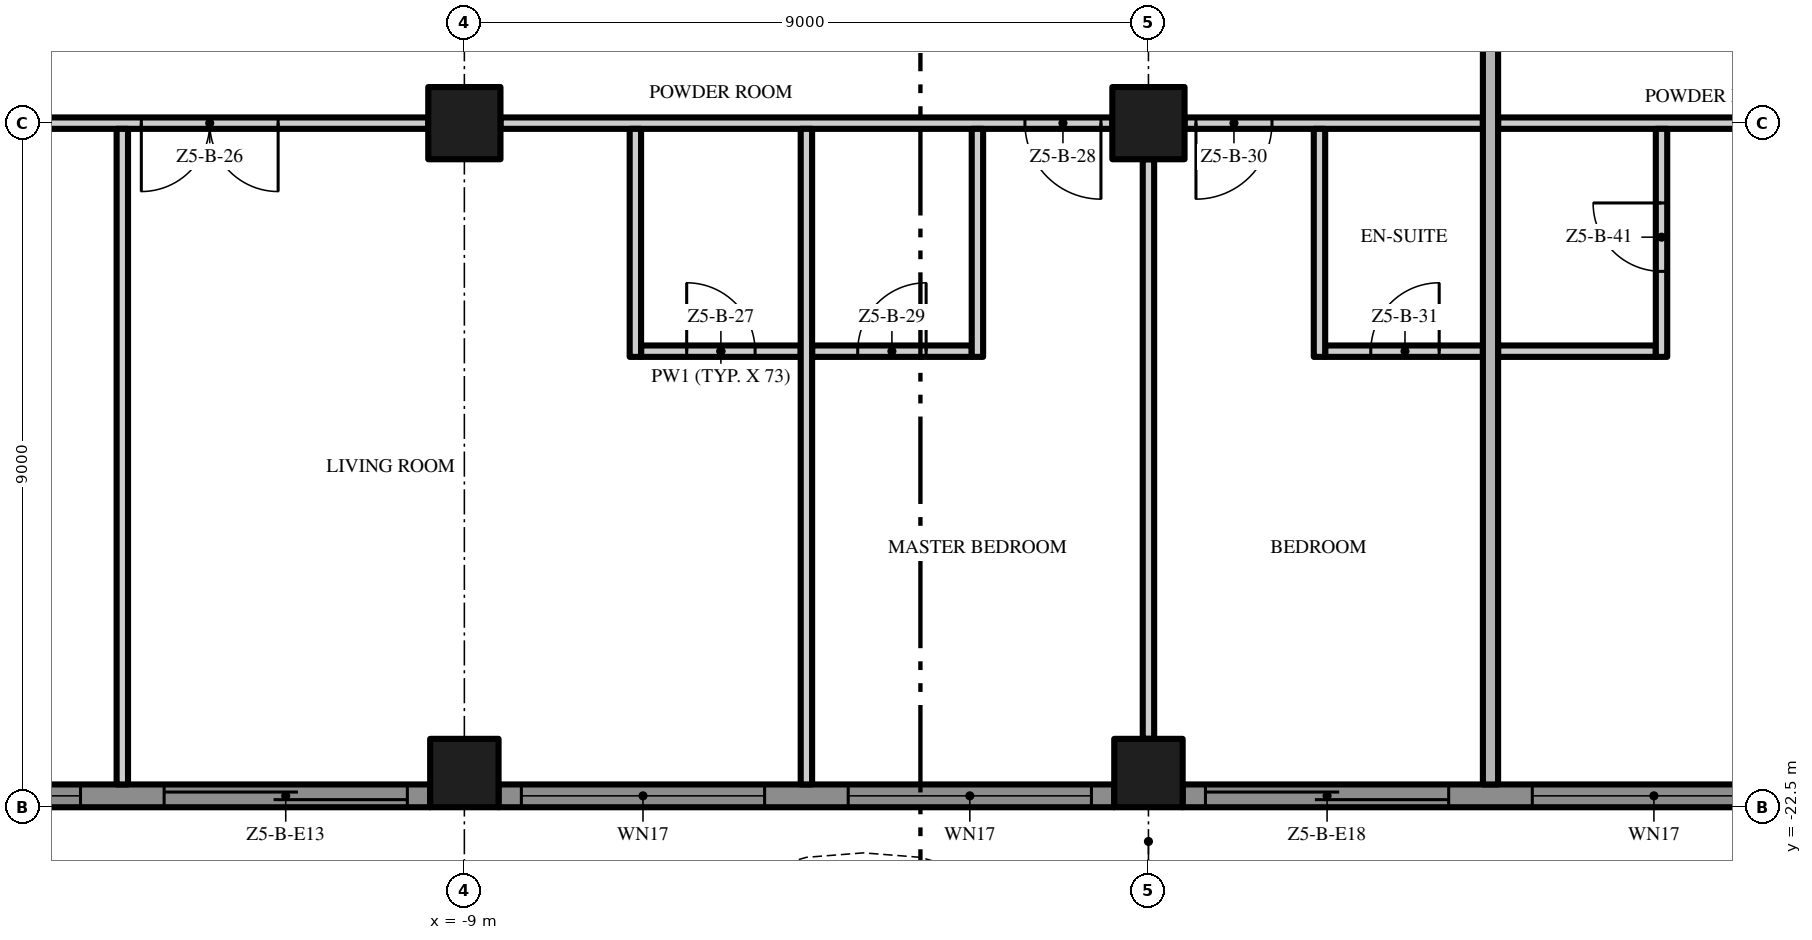
"""IFC4 building model, lengths in metres.
Left out: names, types, materials, properties, quantities, classifications, styles, units other than length and angle.
Written with IfcOpenShell. Run it as: python <this file> out.ifc"""

import sys

from ifc_helpers import new_model, si_unit, direction, frame, frame_2d, origin, origin_2d, place, context, subcontext, project, spatial, polyline, rectangle, outline, extrude, element, fill, save


model = new_model("IFC4")
c1 = context("Model", 3, precision=1e-05, world=origin(), true_north=direction((0.0, 1.0)))
c2 = subcontext(c1, "Body", "Model", "MODEL_VIEW")
j1 = project(units=[si_unit("LENGTHUNIT", "METRE"), si_unit("PLANEANGLEUNIT", "RADIAN")], contexts=[c1])
p1 = place(None, origin())
s1 = spatial("IfcSite", under=j1, at=p1, CompositionType="ELEMENT")
p2 = place(p1, origin())
s2 = spatial("IfcBuilding", under=s1, at=p2, CompositionType="ELEMENT")
p3 = place(p2, frame((0.0, 0.0, 257.8)))
s3 = spatial("IfcBuildingStorey", under=s2, at=p3, CompositionType="ELEMENT", Elevation=257.8)
p4 = place(p3, frame((-9.0, -13.5, 0.0), z_axis=(0.0, 0.0, 1.0), x_axis=(1.0, 0.0, 0.0)))
e1 = element("IfcColumn", 1, at=p4, inside=s3, PredefinedType="COLUMN", context=c2, shape_type="SweptSolid", body=[
    extrude(rectangle(XDim=0.95, YDim=0.95, at=origin_2d()), origin(), (0.0, 0.0, 1.0), 3.5),
])
p5 = place(p3, frame((-9.0, -22.05, 0.0), z_axis=(0.0, 0.0, 1.0), x_axis=(1.0, 0.0, 0.0)))
e2 = element("IfcColumn", 2, at=p5, inside=s3, PredefinedType="COLUMN", context=c2, shape_type="SweptSolid", body=[
    extrude(rectangle(XDim=0.9, YDim=0.9, at=origin_2d()), origin(), (0.0, 0.0, 1.0), 3.5),
])
p6 = place(p3, frame((0.0, -13.5, 0.0), z_axis=(0.0, 0.0, 1.0), x_axis=(1.0, 0.0, 0.0)))
e3 = element("IfcColumn", 3, at=p6, inside=s3, PredefinedType="COLUMN", context=c2, shape_type="SweptSolid", body=[
    extrude(rectangle(XDim=0.95, YDim=0.95, at=origin_2d()), origin(), (0.0, 0.0, 1.0), 3.5),
])
p7 = place(p3, frame((0.0, -22.05, 0.0), z_axis=(0.0, 0.0, 1.0), x_axis=(1.0, 0.0, 0.0)))
e4 = element("IfcColumn", 4, at=p7, inside=s3, PredefinedType="COLUMN", context=c2, shape_type="SweptSolid", body=[
    extrude(rectangle(XDim=0.9, YDim=0.9, at=origin_2d()), origin(), (0.0, 0.0, 1.0), 3.5),
])
p8 = place(p3, frame((-9.45, -22.35, 0.0), z_axis=(0.0, 0.0, 1.0), x_axis=(-1.0, 0.0, 0.0)))
e5 = element("IfcWall", 5, at=p8, inside=s3, PredefinedType="SOLIDWALL", context=c2, shape_type="SweptSolid", body=[
    extrude(rectangle(XDim=8.1, YDim=0.3, at=frame_2d((4.05, 0.0))), origin(), (0.0, 0.0, 1.0), 3.5),
])
p9 = place(p8, frame((4.6, 0.0, 0.45)))
e6 = element("IfcOpeningElement", 6, at=p9, cuts=e5, PredefinedType="OPENING", context=c2, shape_type="SweptSolid", body=[
    extrude(rectangle(XDim=3.2, YDim=2.65, at=frame_2d((1.6, 1.325))), frame((0.0, 0.16, 0.0), z_axis=(0.0, -1.0, 0.0), x_axis=(1.0, 0.0, 0.0)), (0.0, 0.0, 1.0), 0.32),
])
p10 = place(p8, frame((0.3, 0.0, 0.0)))
e7 = element("IfcOpeningElement", 7, at=p10, cuts=e5, PredefinedType="OPENING", context=c2, shape_type="SweptSolid", body=[
    extrude(rectangle(XDim=3.2, YDim=2.4, at=frame_2d((1.6, 1.2))), frame((0.0, 0.16, 0.0), z_axis=(0.0, -1.0, 0.0), x_axis=(1.0, 0.0, 0.0)), (0.0, 0.0, 1.0), 0.32),
])
p11 = place(p3, frame((-0.45, -22.35, 0.0), z_axis=(0.0, 0.0, 1.0), x_axis=(-1.0, 0.0, 0.0)))
e8 = element("IfcWall", 8, at=p11, inside=s3, PredefinedType="SOLIDWALL", context=c2, shape_type="SweptSolid", body=[
    extrude(rectangle(XDim=8.1, YDim=0.3, at=frame_2d((4.05, 0.0))), origin(), (0.0, 0.0, 1.0), 3.5),
])
p12 = place(p11, frame((4.6, 0.0, 0.45)))
e9 = element("IfcOpeningElement", 9, at=p12, cuts=e8, PredefinedType="OPENING", context=c2, shape_type="SweptSolid", body=[
    extrude(rectangle(XDim=3.2, YDim=2.65, at=frame_2d((1.6, 1.325))), frame((0.0, 0.16, 0.0), z_axis=(0.0, -1.0, 0.0), x_axis=(1.0, 0.0, 0.0)), (0.0, 0.0, 1.0), 0.32),
])
p13 = place(p11, frame((0.3, 0.0, 0.45)))
e10 = element("IfcOpeningElement", 10, at=p13, cuts=e8, PredefinedType="OPENING", context=c2, shape_type="SweptSolid", body=[
    extrude(rectangle(XDim=3.2, YDim=2.65, at=frame_2d((1.6, 1.325))), frame((0.0, 0.16, 0.0), z_axis=(0.0, -1.0, 0.0), x_axis=(1.0, 0.0, 0.0)), (0.0, 0.0, 1.0), 0.32),
])
p14 = place(p3, frame((8.55, -22.35, 0.0), z_axis=(0.0, 0.0, 1.0), x_axis=(-1.0, 0.0, 0.0)))
e11 = element("IfcWall", 11, at=p14, inside=s3, PredefinedType="SOLIDWALL", context=c2, shape_type="SweptSolid", body=[
    extrude(rectangle(XDim=8.1, YDim=0.3, at=frame_2d((4.05, 0.0))), origin(), (0.0, 0.0, 1.0), 3.5),
])
p15 = place(p14, frame((4.6, 0.0, 0.0)))
e12 = element("IfcOpeningElement", 12, at=p15, cuts=e11, PredefinedType="OPENING", context=c2, shape_type="SweptSolid", body=[
    extrude(rectangle(XDim=3.2, YDim=2.4, at=frame_2d((1.6, 1.2))), frame((0.0, 0.16, 0.0), z_axis=(0.0, -1.0, 0.0), x_axis=(1.0, 0.0, 0.0)), (0.0, 0.0, 1.0), 0.32),
])
p16 = place(p14, frame((0.3, 0.0, 0.45)))
e13 = element("IfcOpeningElement", 13, at=p16, cuts=e11, PredefinedType="OPENING", context=c2, shape_type="SweptSolid", body=[
    extrude(rectangle(XDim=3.2, YDim=2.65, at=frame_2d((1.6, 1.325))), frame((0.0, 0.16, 0.0), z_axis=(0.0, -1.0, 0.0), x_axis=(1.0, 0.0, 0.0)), (0.0, 0.0, 1.0), 0.32),
])
p17 = place(p3, origin())
e14 = element("IfcWall", 14, at=p17, inside=s3, PredefinedType="USERDEFINED", context=c2, shape_type="SweptSolid", body=[
    extrude(outline(polyline([(-22.5, -24.3), (-21.0, -23.595), (-19.5, -23.159), (-18.75, -23.1), (-18.0, -23.159), (-16.5, -23.595), (-15.0, -24.3), (-13.5, -25.005), (-12.0, -25.441), (-11.25, -25.5), (-10.5, -25.441), (-9.0, -25.005), (-7.5, -24.3), (-6.0, -23.595), (-4.5, -23.159), (-3.75, -23.1), (-3.0, -23.159), (-1.5, -23.595), (0.0, -24.3), (1.5, -25.005), (3.0, -25.441), (3.75, -25.5), (4.5, -25.441), (6.0, -25.005), (7.5, -24.3), (9.0, -23.595), (10.5, -23.159), (11.25, -23.1), (12.0, -23.159), (13.5, -23.595), (15.0, -24.3), (16.5, -25.005), (18.0, -25.441), (18.75, -25.5), (19.5, -25.441), (21.0, -25.005), (22.5, -24.3), (22.394, -24.074), (20.911, -24.771), (19.455, -25.194), (18.75, -25.249), (18.045, -25.194), (16.589, -24.771), (15.106, -24.074), (13.589, -23.36), (12.045, -22.911), (11.25, -22.849), (10.455, -22.911), (8.911, -23.36), (7.394, -24.074), (5.911, -24.771), (4.455, -25.194), (3.75, -25.249), (3.045, -25.194), (1.589, -24.771), (0.106, -24.074), (-1.411, -23.36), (-2.955, -22.911), (-3.75, -22.849), (-4.545, -22.911), (-6.089, -23.36), (-7.606, -24.074), (-9.089, -24.771), (-10.545, -25.194), (-11.25, -25.249), (-11.955, -25.194), (-13.411, -24.771), (-14.894, -24.074), (-16.411, -23.36), (-17.955, -22.911), (-18.75, -22.849), (-19.545, -22.911), (-21.089, -23.36), (-22.606, -24.074), (-22.5, -24.3)])), origin(), (0.0, 0.0, 1.0), 0.9),
])
p18 = place(p3, frame((-6.675, -16.5, 0.0), z_axis=(0.0, 0.0, 1.0), x_axis=(1.0, 0.0, 0.0)))
e15 = element("IfcWall", 15, at=p18, inside=s3, PredefinedType="PARTITIONING", context=c2, shape_type="SweptSolid", body=[
    extrude(rectangle(XDim=2.1, YDim=0.15, at=frame_2d((1.05, 0.0))), origin(), (0.0, 0.0, 1.0), 3.5),
])
p19 = place(p18, frame((0.6, 0.0, 0.0)))
e16 = element("IfcOpeningElement", 16, at=p19, cuts=e15, PredefinedType="OPENING", context=c2, shape_type="SweptSolid", body=[
    extrude(rectangle(XDim=0.9, YDim=2.1, at=frame_2d((0.45, 1.05))), frame((0.0, 0.085, 0.0), z_axis=(0.0, -1.0, 0.0), x_axis=(1.0, 0.0, 0.0)), (0.0, 0.0, 1.0), 0.17),
])
p20 = place(p3, frame((-4.425, -16.5, 0.0), z_axis=(0.0, 0.0, 1.0), x_axis=(1.0, 0.0, 0.0)))
e17 = element("IfcWall", 17, at=p20, inside=s3, PredefinedType="PARTITIONING", context=c2, shape_type="SweptSolid", body=[
    extrude(rectangle(XDim=2.1, YDim=0.15, at=frame_2d((1.05, 0.0))), origin(), (0.0, 0.0, 1.0), 3.5),
])
p21 = place(p20, frame((0.6, 0.0, 0.0)))
e18 = element("IfcOpeningElement", 18, at=p21, cuts=e17, PredefinedType="OPENING", context=c2, shape_type="SweptSolid", body=[
    extrude(rectangle(XDim=0.9, YDim=2.1, at=frame_2d((0.45, 1.05))), frame((0.0, 0.085, 0.0), z_axis=(0.0, -1.0, 0.0), x_axis=(1.0, 0.0, 0.0)), (0.0, 0.0, 1.0), 0.17),
])
p22 = place(p3, frame((2.325, -16.5, 0.0), z_axis=(0.0, 0.0, 1.0), x_axis=(1.0, 0.0, 0.0)))
e19 = element("IfcWall", 19, at=p22, inside=s3, PredefinedType="PARTITIONING", context=c2, shape_type="SweptSolid", body=[
    extrude(rectangle(XDim=2.075, YDim=0.15, at=frame_2d((1.038, 0.0))), origin(), (0.0, 0.0, 1.0), 3.5),
])
p23 = place(p22, frame((0.6, 0.0, 0.0)))
e20 = element("IfcOpeningElement", 20, at=p23, cuts=e19, PredefinedType="OPENING", context=c2, shape_type="SweptSolid", body=[
    extrude(rectangle(XDim=0.9, YDim=2.1, at=frame_2d((0.45, 1.05))), frame((0.0, 0.085, 0.0), z_axis=(0.0, -1.0, 0.0), x_axis=(1.0, 0.0, 0.0)), (0.0, 0.0, 1.0), 0.17),
])
p24 = place(p3, frame((4.6, -16.5, 0.0), z_axis=(0.0, 0.0, 1.0), x_axis=(1.0, 0.0, 0.0)))
e21 = element("IfcWall", 21, at=p24, inside=s3, PredefinedType="PARTITIONING", context=c2, shape_type="SweptSolid", body=[
    extrude(rectangle(XDim=2.075, YDim=0.15, at=frame_2d((1.038, 0.0))), origin(), (0.0, 0.0, 1.0), 3.5),
])
p25 = place(p3, frame((-9.475, -13.5, 0.0), z_axis=(0.0, 0.0, 1.0), x_axis=(-1.0, 0.0, 0.0)))
e22 = element("IfcWall", 22, at=p25, inside=s3, PredefinedType="PARTITIONING", context=c2, shape_type="SweptSolid", body=[
    extrude(rectangle(XDim=8.05, YDim=0.15, at=frame_2d((4.025, 0.0))), origin(), (0.0, 0.0, 1.0), 3.5),
])
p26 = place(p25, frame((1.975, 0.0, 0.0)))
e23 = element("IfcOpeningElement", 23, at=p26, cuts=e22, PredefinedType="OPENING", context=c2, shape_type="SweptSolid", body=[
    extrude(rectangle(XDim=1.8, YDim=2.4, at=frame_2d((0.9, 1.2))), frame((0.0, 0.085, 0.0), z_axis=(0.0, -1.0, 0.0), x_axis=(1.0, 0.0, 0.0)), (0.0, 0.0, 1.0), 0.17),
])
p27 = place(p3, frame((-0.475, -13.5, 0.0), z_axis=(0.0, 0.0, 1.0), x_axis=(-1.0, 0.0, 0.0)))
e24 = element("IfcWall", 24, at=p27, inside=s3, PredefinedType="PARTITIONING", context=c2, shape_type="SweptSolid", body=[
    extrude(rectangle(XDim=8.05, YDim=0.15, at=frame_2d((4.025, 0.0))), origin(), (0.0, 0.0, 1.0), 3.5),
])
p28 = place(p27, frame((0.15, 0.0, 0.0)))
e25 = element("IfcOpeningElement", 25, at=p28, cuts=e24, PredefinedType="OPENING", context=c2, shape_type="SweptSolid", body=[
    extrude(rectangle(XDim=1.0, YDim=2.4, at=frame_2d((0.5, 1.2))), frame((0.0, 0.085, 0.0), z_axis=(0.0, -1.0, 0.0), x_axis=(1.0, 0.0, 0.0)), (0.0, 0.0, 1.0), 0.17),
])
p29 = place(p3, frame((4.4, -13.5, 0.0), z_axis=(0.0, 0.0, 1.0), x_axis=(-1.0, 0.0, 0.0)))
e26 = element("IfcWall", 26, at=p29, inside=s3, PredefinedType="PARTITIONING", context=c2, shape_type="SweptSolid", body=[
    extrude(rectangle(XDim=3.925, YDim=0.15, at=frame_2d((1.962, 0.0))), origin(), (0.0, 0.0, 1.0), 3.5),
])
p30 = place(p29, frame((2.775, 0.0, 0.0)))
e27 = element("IfcOpeningElement", 27, at=p30, cuts=e26, PredefinedType="OPENING", context=c2, shape_type="SweptSolid", body=[
    extrude(rectangle(XDim=1.0, YDim=2.4, at=frame_2d((0.5, 1.2))), frame((0.0, 0.085, 0.0), z_axis=(0.0, -1.0, 0.0), x_axis=(1.0, 0.0, 0.0)), (0.0, 0.0, 1.0), 0.17),
])
p31 = place(p3, frame((4.6, -13.5, 0.0), z_axis=(0.0, 0.0, 1.0), x_axis=(1.0, 0.0, 0.0)))
e28 = element("IfcWall", 28, at=p31, inside=s3, PredefinedType="PARTITIONING", context=c2, shape_type="SweptSolid", body=[
    extrude(rectangle(XDim=3.925, YDim=0.15, at=frame_2d((1.962, 0.0))), origin(), (0.0, 0.0, 1.0), 3.5),
])
p32 = place(p3, frame((-13.5, -22.2, 0.0), z_axis=(0.0, 0.0, 1.0), x_axis=(0.0, 1.0, 0.0)))
e29 = element("IfcWall", 29, at=p32, inside=s3, PredefinedType="PARTITIONING", context=c2, shape_type="SweptSolid", body=[
    extrude(rectangle(XDim=8.625, YDim=0.15, at=frame_2d((4.312, 0.0))), origin(), (0.0, 0.0, 1.0), 3.5),
])
p33 = place(p3, frame((-6.75, -16.575, 0.0), z_axis=(0.0, 0.0, 1.0), x_axis=(0.0, 1.0, 0.0)))
e30 = element("IfcWall", 30, at=p33, inside=s3, PredefinedType="PARTITIONING", context=c2, shape_type="SweptSolid", body=[
    extrude(rectangle(XDim=3.0, YDim=0.15, at=frame_2d((1.5, 0.0))), origin(), (0.0, 0.0, 1.0), 3.5),
])
p34 = place(p3, frame((-4.5, -22.2, 0.0), z_axis=(0.0, 0.0, 1.0), x_axis=(0.0, 1.0, 0.0)))
e31 = element("IfcWall", 31, at=p34, inside=s3, PredefinedType="PARTITIONING", context=c2, shape_type="SweptSolid", body=[
    extrude(rectangle(XDim=8.625, YDim=0.15, at=frame_2d((4.312, 0.0))), origin(), (0.0, 0.0, 1.0), 3.5),
])
p35 = place(p3, frame((-2.25, -16.575, 0.0), z_axis=(0.0, 0.0, 1.0), x_axis=(0.0, 1.0, 0.0)))
e32 = element("IfcWall", 32, at=p35, inside=s3, PredefinedType="PARTITIONING", context=c2, shape_type="SweptSolid", body=[
    extrude(rectangle(XDim=3.0, YDim=0.15, at=frame_2d((1.5, 0.0))), origin(), (0.0, 0.0, 1.0), 3.5),
])
p36 = place(p3, frame((0.0, -21.6, 0.0), z_axis=(0.0, 0.0, 1.0), x_axis=(0.0, 1.0, 0.0)))
e33 = element("IfcWall", 33, at=p36, inside=s3, PredefinedType="PARTITIONING", context=c2, shape_type="SweptSolid", body=[
    extrude(rectangle(XDim=7.625, YDim=0.15, at=frame_2d((3.812, 0.0))), origin(), (0.0, 0.0, 1.0), 3.5),
])
p37 = place(p3, frame((2.25, -16.575, 0.0), z_axis=(0.0, 0.0, 1.0), x_axis=(0.0, 1.0, 0.0)))
e34 = element("IfcWall", 34, at=p37, inside=s3, PredefinedType="PARTITIONING", context=c2, shape_type="SweptSolid", body=[
    extrude(rectangle(XDim=3.0, YDim=0.15, at=frame_2d((1.5, 0.0))), origin(), (0.0, 0.0, 1.0), 3.5),
])
p38 = place(p3, frame((4.5, -22.2, 0.0), z_axis=(0.0, 0.0, 1.0), x_axis=(0.0, 1.0, 0.0)))
e35 = element("IfcWall", 35, at=p38, inside=s3, PredefinedType="PARTITIONING", context=c2, shape_type="SweptSolid", body=[
    extrude(rectangle(XDim=22.1, YDim=0.2, at=frame_2d((11.05, 0.0))), origin(), (0.0, 0.0, 1.0), 3.5),
])
p39 = place(p3, frame((6.75, -16.575, 0.0), z_axis=(0.0, 0.0, 1.0), x_axis=(0.0, 1.0, 0.0)))
e36 = element("IfcWall", 36, at=p39, inside=s3, PredefinedType="PARTITIONING", context=c2, shape_type="SweptSolid", body=[
    extrude(rectangle(XDim=3.0, YDim=0.15, at=frame_2d((1.5, 0.0))), origin(), (0.0, 0.0, 1.0), 3.5),
])
p40 = place(p39, frame((1.125, 0.0, 0.0)))
e37 = element("IfcOpeningElement", 37, at=p40, cuts=e36, PredefinedType="OPENING", context=c2, shape_type="SweptSolid", body=[
    extrude(rectangle(XDim=0.9, YDim=2.1, at=frame_2d((0.45, 1.05))), frame((0.0, 0.085, 0.0), z_axis=(0.0, -1.0, 0.0), x_axis=(1.0, 0.0, 0.0)), (0.0, 0.0, 1.0), 0.17),
])
p41 = place(p9, origin())
e38 = element("IfcWindow", 38, at=p41, inside=s3, PartitioningType="SINGLE_PANEL", PredefinedType="WINDOW", context=c2, shape_type="SweptSolid", body=[
    extrude(rectangle(XDim=3.2, YDim=2.65, at=frame_2d((1.6, 1.325))), frame((0.0, 0.03, 0.0), z_axis=(0.0, -1.0, 0.0), x_axis=(1.0, 0.0, 0.0)), (0.0, 0.0, 1.0), 0.06),
])
fill(e6, e38)
p42 = place(p10, origin())
e39 = element("IfcDoor", 39, at=p42, inside=s3, OperationType="SINGLE_SWING_LEFT", PredefinedType="DOOR", context=c2, shape_type="SweptSolid", body=[
    extrude(rectangle(XDim=3.2, YDim=2.4, at=frame_2d((1.6, 1.2))), frame((0.0, 0.025, 0.0), z_axis=(0.0, -1.0, 0.0), x_axis=(1.0, 0.0, 0.0)), (0.0, 0.0, 1.0), 0.05),
])
fill(e7, e39)
p43 = place(p12, origin())
e40 = element("IfcWindow", 40, at=p43, inside=s3, PartitioningType="SINGLE_PANEL", PredefinedType="WINDOW", context=c2, shape_type="SweptSolid", body=[
    extrude(rectangle(XDim=3.2, YDim=2.65, at=frame_2d((1.6, 1.325))), frame((0.0, 0.03, 0.0), z_axis=(0.0, -1.0, 0.0), x_axis=(1.0, 0.0, 0.0)), (0.0, 0.0, 1.0), 0.06),
])
fill(e9, e40)
p44 = place(p13, origin())
e41 = element("IfcWindow", 41, at=p44, inside=s3, PartitioningType="SINGLE_PANEL", PredefinedType="WINDOW", context=c2, shape_type="SweptSolid", body=[
    extrude(rectangle(XDim=3.2, YDim=2.65, at=frame_2d((1.6, 1.325))), frame((0.0, 0.03, 0.0), z_axis=(0.0, -1.0, 0.0), x_axis=(1.0, 0.0, 0.0)), (0.0, 0.0, 1.0), 0.06),
])
fill(e10, e41)
p45 = place(p15, origin())
e42 = element("IfcDoor", 42, at=p45, inside=s3, OperationType="SINGLE_SWING_LEFT", PredefinedType="DOOR", context=c2, shape_type="SweptSolid", body=[
    extrude(rectangle(XDim=3.2, YDim=2.4, at=frame_2d((1.6, 1.2))), frame((0.0, 0.025, 0.0), z_axis=(0.0, -1.0, 0.0), x_axis=(1.0, 0.0, 0.0)), (0.0, 0.0, 1.0), 0.05),
])
fill(e12, e42)
p46 = place(p16, origin())
e43 = element("IfcWindow", 43, at=p46, inside=s3, PartitioningType="SINGLE_PANEL", PredefinedType="WINDOW", context=c2, shape_type="SweptSolid", body=[
    extrude(rectangle(XDim=3.2, YDim=2.65, at=frame_2d((1.6, 1.325))), frame((0.0, 0.03, 0.0), z_axis=(0.0, -1.0, 0.0), x_axis=(1.0, 0.0, 0.0)), (0.0, 0.0, 1.0), 0.06),
])
fill(e13, e43)
p47 = place(p26, origin())
e44 = element("IfcDoor", 44, at=p47, inside=s3, OperationType="DOUBLE_DOOR_SINGLE_SWING", PredefinedType="DOOR", context=c2, shape_type="SweptSolid", body=[
    extrude(rectangle(XDim=1.8, YDim=2.4, at=frame_2d((0.9, 1.2))), frame((0.0, 0.025, 0.0), z_axis=(0.0, -1.0, 0.0), x_axis=(1.0, 0.0, 0.0)), (0.0, 0.0, 1.0), 0.05),
])
fill(e23, e44)
p48 = place(p19, origin())
e45 = element("IfcDoor", 45, at=p48, inside=s3, OperationType="SINGLE_SWING_LEFT", PredefinedType="DOOR", context=c2, shape_type="SweptSolid", body=[
    extrude(rectangle(XDim=0.9, YDim=2.1, at=frame_2d((0.45, 1.05))), frame((0.0, 0.025, 0.0), z_axis=(0.0, -1.0, 0.0), x_axis=(1.0, 0.0, 0.0)), (0.0, 0.0, 1.0), 0.05),
])
fill(e16, e45)
p49 = place(p28, origin())
e46 = element("IfcDoor", 46, at=p49, inside=s3, OperationType="SINGLE_SWING_LEFT", PredefinedType="DOOR", context=c2, shape_type="SweptSolid", body=[
    extrude(rectangle(XDim=1.0, YDim=2.4, at=frame_2d((0.5, 1.2))), frame((0.0, 0.025, 0.0), z_axis=(0.0, -1.0, 0.0), x_axis=(1.0, 0.0, 0.0)), (0.0, 0.0, 1.0), 0.05),
])
fill(e25, e46)
p50 = place(p21, origin())
e47 = element("IfcDoor", 47, at=p50, inside=s3, OperationType="SINGLE_SWING_RIGHT", PredefinedType="DOOR", context=c2, shape_type="SweptSolid", body=[
    extrude(rectangle(XDim=0.9, YDim=2.1, at=frame_2d((0.45, 1.05))), frame((0.0, 0.025, 0.0), z_axis=(0.0, -1.0, 0.0), x_axis=(1.0, 0.0, 0.0)), (0.0, 0.0, 1.0), 0.05),
])
fill(e18, e47)
p51 = place(p30, origin())
e48 = element("IfcDoor", 48, at=p51, inside=s3, OperationType="SINGLE_SWING_RIGHT", PredefinedType="DOOR", context=c2, shape_type="SweptSolid", body=[
    extrude(rectangle(XDim=1.0, YDim=2.4, at=frame_2d((0.5, 1.2))), frame((0.0, 0.025, 0.0), z_axis=(0.0, -1.0, 0.0), x_axis=(1.0, 0.0, 0.0)), (0.0, 0.0, 1.0), 0.05),
])
fill(e27, e48)
p52 = place(p23, origin())
e49 = element("IfcDoor", 49, at=p52, inside=s3, OperationType="SINGLE_SWING_RIGHT", PredefinedType="DOOR", context=c2, shape_type="SweptSolid", body=[
    extrude(rectangle(XDim=0.9, YDim=2.1, at=frame_2d((0.45, 1.05))), frame((0.0, 0.025, 0.0), z_axis=(0.0, -1.0, 0.0), x_axis=(1.0, 0.0, 0.0)), (0.0, 0.0, 1.0), 0.05),
])
fill(e20, e49)
p53 = place(p40, origin())
e50 = element("IfcDoor", 50, at=p53, inside=s3, OperationType="SINGLE_SWING_RIGHT", PredefinedType="DOOR", context=c2, shape_type="SweptSolid", body=[
    extrude(rectangle(XDim=0.9, YDim=2.1, at=frame_2d((0.45, 1.05))), frame((0.0, 0.025, 0.0), z_axis=(0.0, -1.0, 0.0), x_axis=(1.0, 0.0, 0.0)), (0.0, 0.0, 1.0), 0.05),
])
fill(e37, e50)
save(model, sys.argv[1])
